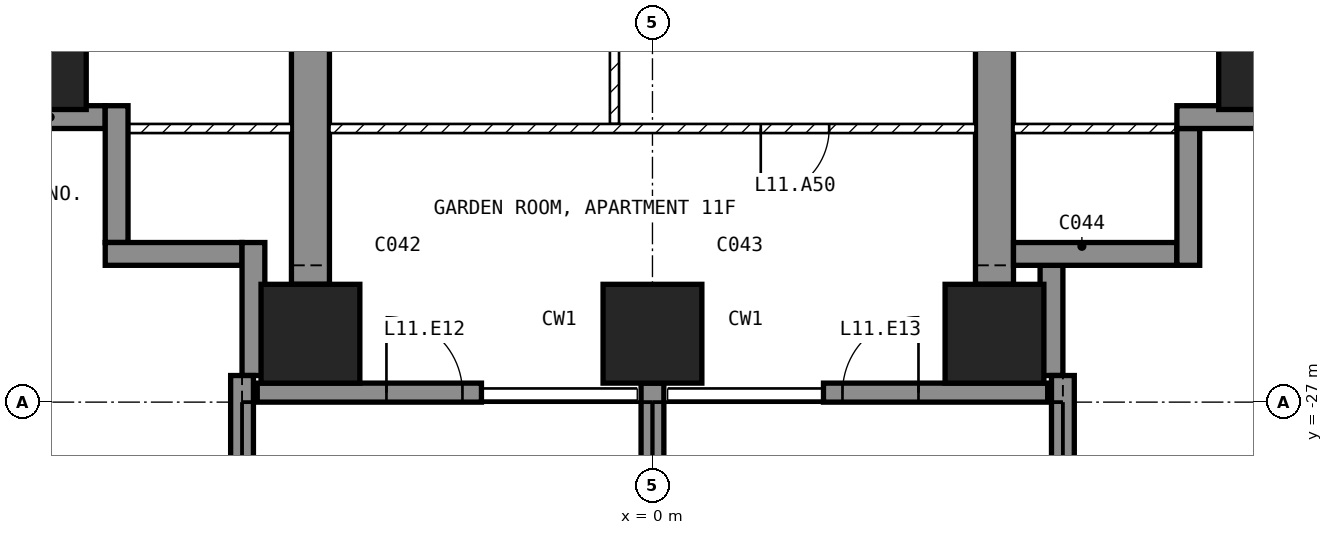
"""IFC4 building model, lengths in metres.
Left out: names, types, materials, properties, quantities, classifications, styles, units other than length and angle.
Written with IfcOpenShell. Run it as: python <this file> out.ifc"""

import sys

from ifc_helpers import new_model, si_unit, direction, frame, frame_2d, origin, origin_2d, place, context, subcontext, project, spatial, polyline, rectangle, outline, extrude, element, fill, save


model = new_model("IFC4")
c1 = context("Model", 3, precision=1e-05, world=origin(), true_north=direction((0.0, 1.0)))
c2 = subcontext(c1, "Body", "Model", "MODEL_VIEW")
j1 = project(units=[si_unit("LENGTHUNIT", "METRE"), si_unit("PLANEANGLEUNIT", "RADIAN")], contexts=[c1])
p1 = place(None, origin())
s1 = spatial("IfcSite", under=j1, at=p1, CompositionType="ELEMENT")
p2 = place(p1, origin())
s2 = spatial("IfcBuilding", under=s1, at=p2, CompositionType="ELEMENT")
p3 = place(p2, frame((0.0, 0.0, 57.5)))
s3 = spatial("IfcBuildingStorey", under=s2, at=p3, CompositionType="ELEMENT", Elevation=57.5)
for number, where, z_axis, x_axis in (
    (1, (-8.1, -22.5, -0.25), (0.0, 0.0, 1.0), (1.0, 0.0, 0.0)),
    (2, (-4.5, -26.1, -0.25), (0.0, 0.0, 1.0), (1.0, 0.0, 0.0)),
    (3, (0.0, -26.1, -0.25), (0.0, 0.0, 1.0), (1.0, 0.0, 0.0)),
    (4, (4.5, -26.1, -0.25), (0.0, 0.0, 1.0), (1.0, 0.0, 0.0)),
    (5, (8.1, -22.5, -0.25), (0.0, 0.0, 1.0), (1.0, 0.0, 0.0)),
):
    element("IfcColumn", number, at=place(p3, frame(where, z_axis=z_axis, x_axis=x_axis)), inside=s3, PredefinedType="COLUMN", context=c2, shape_type="SweptSolid", body=[
        extrude(rectangle(XDim=1.3, YDim=1.3, at=origin_2d()), origin(), (0.0, 0.0, 1.0), 3.5),
    ])
for number, where, z_axis, x_axis in (
    (6, (-4.75, -25.45, -0.25), (1.0, 0.0, 0.0), (0.0, 1.0, 0.0)),
    (7, (4.25, -25.45, -0.25), (1.0, 0.0, 0.0), (0.0, 1.0, 0.0)),
):
    element("IfcWall", number, at=place(p3, frame(where, z_axis=z_axis, x_axis=x_axis)), inside=s3, PredefinedType="SHEAR", context=c2, shape_type="SweptSolid", body=[
        extrude(outline(polyline([(0.0, 0.0), (4.15, 0.0), (4.15, 2.65), (6.55, 2.65), (6.55, 0.0), (11.95, 0.0), (11.95, 2.65), (14.35, 2.65), (14.35, 0.0), (16.45, 0.0), (16.45, 3.5), (0.0, 3.5), (0.0, 0.0)])), origin(), (0.0, 0.0, 1.0), 0.5),
    ])
p4 = place(p3, frame((-5.2, -26.875, 0.0), z_axis=(0.0, 0.0, 1.0), x_axis=(1.0, 0.0, 0.0)))
e8 = element("IfcWall", 8, at=p4, inside=s3, PredefinedType="SOLIDWALL", context=c2, shape_type="SweptSolid", body=[
    extrude(rectangle(XDim=2.95, YDim=0.25, at=frame_2d((1.475, 0.0))), origin(), (0.0, 0.0, 1.0), 3.25),
])
p5 = place(p4, frame((1.7, 0.0, 0.0)))
e9 = element("IfcOpeningElement", 9, at=p5, cuts=e8, PredefinedType="OPENING", context=c2, shape_type="SweptSolid", body=[
    extrude(rectangle(XDim=1.0, YDim=2.4, at=frame_2d((0.5, 1.2))), frame((0.0, 0.135, 0.0), z_axis=(0.0, -1.0, 0.0), x_axis=(1.0, 0.0, 0.0)), (0.0, 0.0, 1.0), 0.27),
])
p6 = place(p3, frame((2.25, -26.875, 0.0), z_axis=(0.0, 0.0, 1.0), x_axis=(1.0, 0.0, 0.0)))
e10 = element("IfcWall", 10, at=p6, inside=s3, PredefinedType="SOLIDWALL", context=c2, shape_type="SweptSolid", body=[
    extrude(rectangle(XDim=2.95, YDim=0.25, at=frame_2d((1.475, 0.0))), origin(), (0.0, 0.0, 1.0), 3.25),
])
p7 = place(p6, frame((0.25, 0.0, 0.0)))
e11 = element("IfcOpeningElement", 11, at=p7, cuts=e10, PredefinedType="OPENING", context=c2, shape_type="SweptSolid", body=[
    extrude(rectangle(XDim=1.0, YDim=2.4, at=frame_2d((0.5, 1.2))), frame((0.0, 0.135, 0.0), z_axis=(0.0, -1.0, 0.0), x_axis=(1.0, 0.0, 0.0)), (0.0, 0.0, 1.0), 0.27),
])
p8 = place(p3, frame((5.25, -26.65, 0.0), z_axis=(0.0, 0.0, 1.0), x_axis=(0.0, 1.0, 0.0)))
e12 = element("IfcWall", 12, at=p8, inside=s3, PredefinedType="SOLIDWALL", context=c2, shape_type="SweptSolid", body=[
    extrude(rectangle(XDim=1.45, YDim=0.3, at=frame_2d((0.725, 0.0))), origin(), (0.0, 0.0, 1.0), 3.25),
])
p9 = place(p3, frame((4.75, -25.05, 0.0), z_axis=(0.0, 0.0, 1.0), x_axis=(1.0, 0.0, 0.0)))
e13 = element("IfcWall", 13, at=p9, inside=s3, PredefinedType="SOLIDWALL", context=c2, shape_type="SweptSolid", body=[
    extrude(rectangle(XDim=2.15, YDim=0.3, at=frame_2d((1.075, 0.0))), origin(), (0.0, 0.0, 1.0), 3.25),
])
p10 = place(p3, frame((7.05, -25.2, 0.0), z_axis=(0.0, 0.0, 1.0), x_axis=(0.0, 1.0, 0.0)))
e14 = element("IfcWall", 14, at=p10, inside=s3, PredefinedType="SOLIDWALL", context=c2, shape_type="SweptSolid", body=[
    extrude(rectangle(XDim=1.8, YDim=0.3, at=frame_2d((0.9, 0.0))), origin(), (0.0, 0.0, 1.0), 3.25),
])
p11 = place(p3, frame((6.9, -23.25, 0.0), z_axis=(0.0, 0.0, 1.0), x_axis=(1.0, 0.0, 0.0)))
e15 = element("IfcWall", 15, at=p11, inside=s3, PredefinedType="SOLIDWALL", context=c2, shape_type="SweptSolid", body=[
    extrude(rectangle(XDim=1.75, YDim=0.3, at=frame_2d((0.875, 0.0))), origin(), (0.0, 0.0, 1.0), 3.25),
])
p12 = place(p3, frame((-8.65, -23.25, 0.0), z_axis=(0.0, 0.0, 1.0), x_axis=(1.0, 0.0, 0.0)))
e16 = element("IfcWall", 16, at=p12, inside=s3, PredefinedType="SOLIDWALL", context=c2, shape_type="SweptSolid", body=[
    extrude(rectangle(XDim=1.45, YDim=0.3, at=frame_2d((0.725, 0.0))), origin(), (0.0, 0.0, 1.0), 3.25),
])
p13 = place(p3, frame((-7.05, -23.1, 0.0), z_axis=(0.0, 0.0, 1.0), x_axis=(0.0, -1.0, 0.0)))
e17 = element("IfcWall", 17, at=p13, inside=s3, PredefinedType="SOLIDWALL", context=c2, shape_type="SweptSolid", body=[
    extrude(rectangle(XDim=1.8, YDim=0.3, at=frame_2d((0.9, 0.0))), origin(), (0.0, 0.0, 1.0), 3.25),
])
p14 = place(p3, frame((-7.2, -25.05, 0.0), z_axis=(0.0, 0.0, 1.0), x_axis=(1.0, 0.0, 0.0)))
e18 = element("IfcWall", 18, at=p14, inside=s3, PredefinedType="SOLIDWALL", context=c2, shape_type="SweptSolid", body=[
    extrude(rectangle(XDim=1.8, YDim=0.3, at=frame_2d((0.9, 0.0))), origin(), (0.0, 0.0, 1.0), 3.25),
])
p15 = place(p3, frame((-5.25, -24.9, 0.0), z_axis=(0.0, 0.0, 1.0), x_axis=(0.0, -1.0, 0.0)))
e19 = element("IfcWall", 19, at=p15, inside=s3, PredefinedType="SOLIDWALL", context=c2, shape_type="SweptSolid", body=[
    extrude(rectangle(XDim=1.75, YDim=0.3, at=frame_2d((0.875, 0.0))), origin(), (0.0, 0.0, 1.0), 3.25),
])
p16 = place(p3, frame((-5.4, -26.65, 0.0), z_axis=(0.0, 0.0, 1.0), x_axis=(0.0, -1.0, 0.0)))
e20 = element("IfcWall", 20, at=p16, inside=s3, PredefinedType="SOLIDWALL", context=c2, shape_type="SweptSolid", body=[
    extrude(rectangle(XDim=3.05, YDim=0.3, at=frame_2d((1.525, 0.0))), origin(), (0.0, 0.0, 1.0), 3.25),
])
p17 = place(p3, frame((0.0, -26.75, 0.0), z_axis=(0.0, 0.0, 1.0), x_axis=(0.0, -1.0, 0.0)))
e21 = element("IfcWall", 21, at=p17, inside=s3, PredefinedType="SOLIDWALL", context=c2, shape_type="SweptSolid", body=[
    extrude(rectangle(XDim=2.95, YDim=0.3, at=frame_2d((1.475, 0.0))), origin(), (0.0, 0.0, 1.0), 3.25),
])
p18 = place(p3, frame((5.4, -26.65, 0.0), z_axis=(0.0, 0.0, 1.0), x_axis=(0.0, -1.0, 0.0)))
e22 = element("IfcWall", 22, at=p18, inside=s3, PredefinedType="SOLIDWALL", context=c2, shape_type="SweptSolid", body=[
    extrude(rectangle(XDim=3.05, YDim=0.3, at=frame_2d((1.525, 0.0))), origin(), (0.0, 0.0, 1.0), 3.25),
])
p19 = place(p3, frame((-0.5, -23.34, 0.0), z_axis=(0.0, 0.0, 1.0), x_axis=(0.0, 1.0, 0.0)))
e23 = element("IfcWall", 23, at=p19, inside=s3, PredefinedType="PARTITIONING", context=c2, shape_type="SweptSolid", body=[
    extrude(rectangle(XDim=4.38, YDim=0.12, at=frame_2d((2.19, 0.0))), origin(), (0.0, 0.0, 1.0), 3.25),
])
p20 = place(p19, frame((1.74, 0.0, 0.0)))
e24 = element("IfcOpeningElement", 24, at=p20, cuts=e23, PredefinedType="OPENING", context=c2, shape_type="SweptSolid", body=[
    extrude(rectangle(XDim=0.9, YDim=2.1, at=frame_2d((0.45, 1.05))), frame((0.0, 0.07, 0.0), z_axis=(0.0, -1.0, 0.0), x_axis=(1.0, 0.0, 0.0)), (0.0, 0.0, 1.0), 0.14),
])
p21 = place(p3, frame((4.25, -23.4, 0.0), z_axis=(0.0, 0.0, 1.0), x_axis=(-1.0, 0.0, 0.0)))
e25 = element("IfcWall", 25, at=p21, inside=s3, PredefinedType="PARTITIONING", context=c2, shape_type="SweptSolid", body=[
    extrude(rectangle(XDim=8.5, YDim=0.12, at=frame_2d((4.25, 0.0))), origin(), (0.0, 0.0, 1.0), 3.25),
])
p22 = place(p21, frame((1.925, 0.0, 0.0)))
e26 = element("IfcOpeningElement", 26, at=p22, cuts=e25, PredefinedType="OPENING", context=c2, shape_type="SweptSolid", body=[
    extrude(rectangle(XDim=0.9, YDim=2.1, at=frame_2d((0.45, 1.05))), frame((0.0, 0.07, 0.0), z_axis=(0.0, -1.0, 0.0), x_axis=(1.0, 0.0, 0.0)), (0.0, 0.0, 1.0), 0.14),
])
for number, where, z_axis, x_axis in (
    (27, (7.12, -23.4, 0.0), (0.0, 0.0, 1.0), (-1.0, 0.0, 0.0)),
    (28, (-4.75, -23.4, 0.0), (0.0, 0.0, 1.0), (-1.0, 0.0, 0.0)),
):
    element("IfcWall", number, at=place(p3, frame(where, z_axis=z_axis, x_axis=x_axis)), inside=s3, PredefinedType="PARTITIONING", context=c2, shape_type="SweptSolid", body=[
        extrude(rectangle(XDim=2.37, YDim=0.12, at=frame_2d((1.185, 0.0))), origin(), (0.0, 0.0, 1.0), 3.25),
    ])
p23 = place(p5, origin())
e29 = element("IfcDoor", 29, at=p23, inside=s3, OperationType="SINGLE_SWING_LEFT", PredefinedType="DOOR", context=c2, shape_type="SweptSolid", body=[
    extrude(rectangle(XDim=1.0, YDim=2.4, at=frame_2d((0.5, 1.2))), frame((0.0, 0.025, 0.0), z_axis=(0.0, -1.0, 0.0), x_axis=(1.0, 0.0, 0.0)), (0.0, 0.0, 1.0), 0.05),
])
fill(e9, e29)
p24 = place(p7, origin())
e30 = element("IfcDoor", 30, at=p24, inside=s3, OperationType="SINGLE_SWING_RIGHT", PredefinedType="DOOR", context=c2, shape_type="SweptSolid", body=[
    extrude(rectangle(XDim=1.0, YDim=2.4, at=frame_2d((0.5, 1.2))), frame((0.0, 0.025, 0.0), z_axis=(0.0, -1.0, 0.0), x_axis=(1.0, 0.0, 0.0)), (0.0, 0.0, 1.0), 0.05),
])
fill(e11, e30)
p25 = place(p22, origin())
e31 = element("IfcDoor", 31, at=p25, inside=s3, OperationType="SINGLE_SWING_RIGHT", PredefinedType="DOOR", context=c2, shape_type="SweptSolid", body=[
    extrude(rectangle(XDim=0.9, YDim=2.1, at=frame_2d((0.45, 1.05))), frame((0.0, 0.025, 0.0), z_axis=(0.0, -1.0, 0.0), x_axis=(1.0, 0.0, 0.0)), (0.0, 0.0, 1.0), 0.05),
])
fill(e26, e31)
save(model, sys.argv[1])
